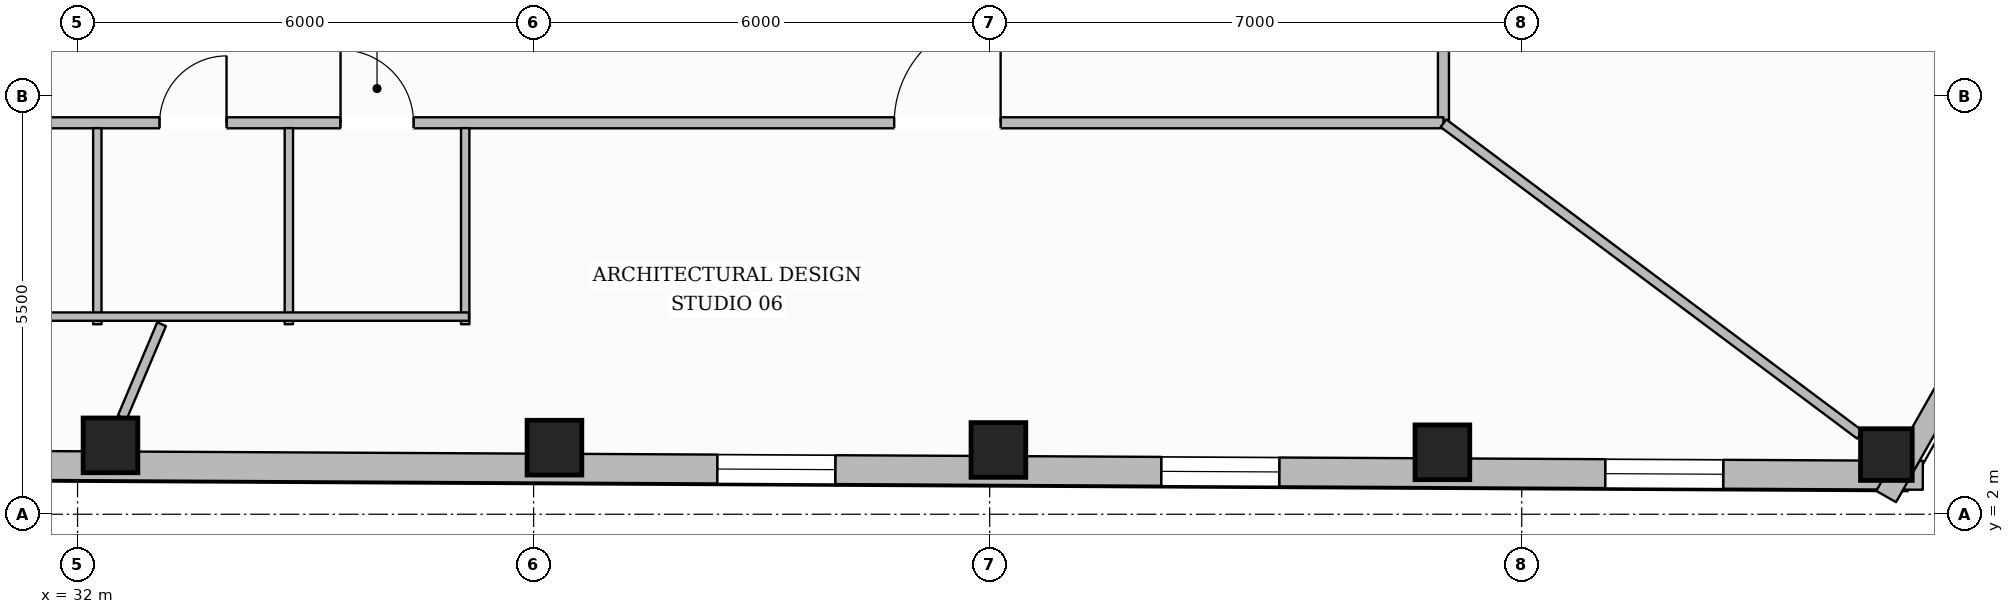
"""IFC4 building model, lengths in metres.
Left out: names, types, materials, properties, quantities, classifications, styles, units other than length and angle.
Written with IfcOpenShell. Run it as: python <this file> out.ifc"""

import sys

from ifc_helpers import new_model, si_unit, direction, frame, frame_2d, origin, origin_2d, place, context, subcontext, project, spatial, rectangle, hollow_rectangle, extrude, element, fill, save


model = new_model("IFC4")
c1 = context("Model", 3, precision=1e-05, world=origin(), true_north=direction((0.0, 1.0)))
c2 = subcontext(c1, "Body", "Model", "MODEL_VIEW")
j1 = project(units=[si_unit("LENGTHUNIT", "METRE"), si_unit("PLANEANGLEUNIT", "RADIAN")], contexts=[c1])
p1 = place(None, origin())
s1 = spatial("IfcSite", under=j1, at=p1, CompositionType="ELEMENT")
p2 = place(p1, origin())
s2 = spatial("IfcBuilding", under=s1, at=p2, CompositionType="ELEMENT")
p3 = place(p2, frame((0.0, 0.0, 100.9)))
s3 = spatial("IfcBuildingStorey", under=s2, at=p3, CompositionType="ELEMENT", Elevation=100.9)
for number, where, z_axis, x_axis in (
    (1, (32.433, 2.906, 0.0), (0.0, 0.0, 1.0), (1.0, 0.0, 0.0)),
    (2, (38.274, 2.876, 0.0), (0.0, 0.0, 1.0), (1.0, 0.0, 0.0)),
    (3, (44.115, 2.845, 0.0), (0.0, 0.0, 1.0), (1.0, 0.0, 0.0)),
    (4, (49.956, 2.815, 0.0), (0.0, 0.0, 1.0), (1.0, 0.0, 0.0)),
):
    element("IfcColumn", number, at=place(p3, frame(where, z_axis=z_axis, x_axis=x_axis)), inside=s3, PredefinedType="COLUMN", context=c2, shape_type="SweptSolid", body=[
        extrude(hollow_rectangle(XDim=0.72, YDim=0.72, WallThickness=0.032, at=origin_2d()), origin(), (0.0, 0.0, 1.0), 3.6),
    ])
p4 = place(p3, frame((55.797, 2.785, 0.0), z_axis=(0.0, 0.0, 1.0), x_axis=(1.0, 0.0, 0.0)))
e5 = element("IfcColumn", 5, at=p4, inside=s3, PredefinedType="COLUMN", context=c2, shape_type="SweptSolid", body=[
    extrude(hollow_rectangle(XDim=0.68, YDim=0.68, WallThickness=0.03, at=origin_2d()), origin(), (0.0, 0.0, 1.0), 3.6),
])
p5 = place(p3, frame((56.277, 2.512, 0.0), z_axis=(0.0, 0.0, 1.0), x_axis=(-0.999986545033, 0.005187461141, 0.0)))
e6 = element("IfcWall", 6, at=p5, inside=s3, PredefinedType="STANDARD", context=c2, shape_type="SweptSolid", body=[
    extrude(rectangle(XDim=36.004, YDim=0.38, at=frame_2d((18.002, 0.0))), origin(), (0.0, 0.0, 1.0), 3.059),
])
p6 = place(p5, frame((31.832, 0.0, 0.65)))
e7 = element("IfcOpeningElement", 7, at=p6, cuts=e6, PredefinedType="OPENING", context=c2, shape_type="SweptSolid", body=[
    extrude(rectangle(XDim=1.55, YDim=1.75, at=frame_2d((0.775, 0.875))), frame((0.0, 0.2, 0.0), z_axis=(0.0, -1.0, 0.0), x_axis=(1.0, 0.0, 0.0)), (0.0, 0.0, 1.0), 0.4),
])
p7 = place(p5, frame((25.991, 0.0, 0.65)))
e8 = element("IfcOpeningElement", 8, at=p7, cuts=e6, PredefinedType="OPENING", context=c2, shape_type="SweptSolid", body=[
    extrude(rectangle(XDim=1.55, YDim=1.75, at=frame_2d((0.775, 0.875))), frame((0.0, 0.2, 0.0), z_axis=(0.0, -1.0, 0.0), x_axis=(1.0, 0.0, 0.0)), (0.0, 0.0, 1.0), 0.4),
])
p8 = place(p5, frame((14.309, 0.0, 0.65)))
e9 = element("IfcOpeningElement", 9, at=p8, cuts=e6, PredefinedType="OPENING", context=c2, shape_type="SweptSolid", body=[
    extrude(rectangle(XDim=1.55, YDim=1.75, at=frame_2d((0.775, 0.875))), frame((0.0, 0.2, 0.0), z_axis=(0.0, -1.0, 0.0), x_axis=(1.0, 0.0, 0.0)), (0.0, 0.0, 1.0), 0.4),
])
p9 = place(p5, frame((8.468, 0.0, 0.65)))
e10 = element("IfcOpeningElement", 10, at=p9, cuts=e6, PredefinedType="OPENING", context=c2, shape_type="SweptSolid", body=[
    extrude(rectangle(XDim=1.55, YDim=1.75, at=frame_2d((0.775, 0.875))), frame((0.0, 0.2, 0.0), z_axis=(0.0, -1.0, 0.0), x_axis=(1.0, 0.0, 0.0)), (0.0, 0.0, 1.0), 0.4),
])
p10 = place(p5, frame((2.627, 0.0, 0.65)))
e11 = element("IfcOpeningElement", 11, at=p10, cuts=e6, PredefinedType="OPENING", context=c2, shape_type="SweptSolid", body=[
    extrude(rectangle(XDim=1.55, YDim=1.75, at=frame_2d((0.775, 0.875))), frame((0.0, 0.2, 0.0), z_axis=(0.0, -1.0, 0.0), x_axis=(1.0, 0.0, 0.0)), (0.0, 0.0, 1.0), 0.4),
])
p11 = place(p3, frame((62.28, 13.652, 0.0), z_axis=(0.0, 0.0, 1.0), x_axis=(-0.493862788891, -0.869539847131, 0.0)))
e12 = element("IfcWall", 12, at=p11, inside=s3, PredefinedType="STANDARD", context=c2, shape_type="SweptSolid", body=[
    extrude(rectangle(XDim=13.132, YDim=0.3, at=frame_2d((6.566, 0.0))), origin(), (0.0, 0.0, 1.0), 3.059),
])
p12 = place(p11, frame((5.966, 0.0, 0.65)))
e13 = element("IfcOpeningElement", 13, at=p12, cuts=e12, PredefinedType="OPENING", context=c2, shape_type="SweptSolid", body=[
    extrude(rectangle(XDim=1.2, YDim=1.7, at=frame_2d((0.6, 0.85))), frame((0.0, 0.16, 0.0), z_axis=(0.0, -1.0, 0.0), x_axis=(1.0, 0.0, 0.0)), (0.0, 0.0, 1.0), 0.32),
])
p13 = place(p3, frame((49.97, 7.15, 0.0), z_axis=(0.0, 0.0, 1.0), x_axis=(0.0, 1.0, 0.0)))
e14 = element("IfcWall", 14, at=p13, inside=s3, PredefinedType="PARTITIONING", context=c2, shape_type="SweptSolid", body=[
    extrude(rectangle(XDim=17.9, YDim=0.145, at=frame_2d((8.95, 0.0))), origin(), (0.0, 0.0, 1.0), 3.288),
])
p14 = place(p13, frame((8.25, 0.0, 0.0)))
e15 = element("IfcOpeningElement", 15, at=p14, cuts=e14, PredefinedType="OPENING", context=c2, shape_type="SweptSolid", body=[
    extrude(rectangle(XDim=1.4, YDim=2.2, at=frame_2d((0.7, 1.1))), frame((0.0, 0.083, 0.0), z_axis=(0.0, -1.0, 0.0), x_axis=(1.0, 0.0, 0.0)), (0.0, 0.0, 1.0), 0.165),
])
p15 = place(p3, frame((26.03, 7.15, 0.0), z_axis=(0.0, 0.0, 1.0), x_axis=(1.0, 0.0, 0.0)))
e16 = element("IfcWall", 16, at=p15, inside=s3, PredefinedType="PARTITIONING", context=c2, shape_type="SweptSolid", body=[
    extrude(rectangle(XDim=23.94, YDim=0.145, at=frame_2d((11.97, 0.0))), origin(), (0.0, 0.0, 1.0), 3.6),
])
p16 = place(p15, frame((4.53, 0.0, 0.0)))
e17 = element("IfcOpeningElement", 17, at=p16, cuts=e16, PredefinedType="OPENING", context=c2, shape_type="SweptSolid", body=[
    extrude(rectangle(XDim=0.88, YDim=2.1, at=frame_2d((0.44, 1.05))), frame((0.0, 0.083, 0.0), z_axis=(0.0, -1.0, 0.0), x_axis=(1.0, 0.0, 0.0)), (0.0, 0.0, 1.0), 0.165),
])
p17 = place(p15, frame((7.05, 0.0, 0.0)))
e18 = element("IfcOpeningElement", 18, at=p17, cuts=e16, PredefinedType="OPENING", context=c2, shape_type="SweptSolid", body=[
    extrude(rectangle(XDim=0.88, YDim=2.1, at=frame_2d((0.44, 1.05))), frame((0.0, 0.083, 0.0), z_axis=(0.0, -1.0, 0.0), x_axis=(1.0, 0.0, 0.0)), (0.0, 0.0, 1.0), 0.165),
])
p18 = place(p15, frame((9.43, 0.0, 0.0)))
e19 = element("IfcOpeningElement", 19, at=p18, cuts=e16, PredefinedType="OPENING", context=c2, shape_type="SweptSolid", body=[
    extrude(rectangle(XDim=0.96, YDim=2.1, at=frame_2d((0.48, 1.05))), frame((0.0, 0.083, 0.0), z_axis=(0.0, -1.0, 0.0), x_axis=(1.0, 0.0, 0.0)), (0.0, 0.0, 1.0), 0.165),
])
p19 = place(p15, frame((1.456, 0.0, 0.0)))
e20 = element("IfcOpeningElement", 20, at=p19, cuts=e16, PredefinedType="OPENING", context=c2, shape_type="SweptSolid", body=[
    extrude(rectangle(XDim=0.98, YDim=2.15, at=frame_2d((0.49, 1.075))), frame((0.0, 0.083, 0.0), z_axis=(0.0, -1.0, 0.0), x_axis=(1.0, 0.0, 0.0)), (0.0, 0.0, 1.0), 0.165),
])
p20 = place(p15, frame((16.714, 0.0, 0.0)))
e21 = element("IfcOpeningElement", 21, at=p20, cuts=e16, PredefinedType="OPENING", context=c2, shape_type="SweptSolid", body=[
    extrude(rectangle(XDim=1.4, YDim=2.2, at=frame_2d((0.7, 1.1))), frame((0.0, 0.083, 0.0), z_axis=(0.0, -1.0, 0.0), x_axis=(1.0, 0.0, 0.0)), (0.0, 0.0, 1.0), 0.165),
])
p21 = place(p3, frame((32.26, 4.5, 0.0), z_axis=(0.0, 0.0, 1.0), x_axis=(0.0, 1.0, 0.0)))
e22 = element("IfcWall", 22, at=p21, inside=s3, PredefinedType="PLUMBINGWALL", context=c2, shape_type="SweptSolid", body=[
    extrude(rectangle(XDim=2.58, YDim=0.11, at=frame_2d((1.29, 0.0))), origin(), (0.0, 0.0, 1.0), 3.141),
])
for number, where, z_axis, x_axis in (
    (23, (34.78, 4.5, 0.0), (0.0, 0.0, 1.0), (0.0, 1.0, 0.0)),
    (24, (37.1, 4.5, 0.0), (0.0, 0.0, 1.0), (0.0, 1.0, 0.0)),
):
    element("IfcWall", number, at=place(p3, frame(where, z_axis=z_axis, x_axis=x_axis)), inside=s3, PredefinedType="PLUMBINGWALL", context=c2, shape_type="SweptSolid", body=[
        extrude(rectangle(XDim=2.58, YDim=0.11, at=frame_2d((1.29, 0.0))), origin(), (0.0, 0.0, 1.0), 3.6),
    ])
p22 = place(p3, frame((29.69, 4.6, 0.0), z_axis=(0.0, 0.0, 1.0), x_axis=(1.0, 0.0, 0.0)))
e25 = element("IfcWall", 25, at=p22, inside=s3, PredefinedType="PLUMBINGWALL", context=c2, shape_type="SweptSolid", body=[
    extrude(rectangle(XDim=7.46, YDim=0.11, at=frame_2d((3.73, 0.0))), origin(), (0.0, 0.0, 1.0), 3.6),
])
p23 = place(p3, frame((33.106, 4.5, 0.0), z_axis=(0.0, 0.0, 1.0), x_axis=(-0.388819762507, -0.921313840276, 0.0)))
e26 = element("IfcWall", 26, at=p23, inside=s3, PredefinedType="PARTITIONING", context=c2, shape_type="SweptSolid", body=[
    extrude(rectangle(XDim=1.331, YDim=0.125, at=frame_2d((0.665, 0.0))), origin(), (0.0, 0.0, 1.0), 3.6),
])
p24 = place(p3, frame((49.97, 7.145, 0.0), z_axis=(0.0, 0.0, 1.0), x_axis=(0.800705856265, -0.599057703183, 0.0)))
e27 = element("IfcWall", 27, at=p24, inside=s3, PredefinedType="PARTITIONING", context=c2, shape_type="SweptSolid", body=[
    extrude(rectangle(XDim=6.843, YDim=0.125, at=frame_2d((3.421, 0.0))), origin(), (0.0, 0.0, 1.0), 3.141),
])
p25 = place(p8, origin())
e28 = element("IfcWindow", 28, at=p25, inside=s3, PartitioningType="SINGLE_PANEL", PredefinedType="WINDOW", context=c2, shape_type="SweptSolid", body=[
    extrude(rectangle(XDim=1.55, YDim=1.75, at=frame_2d((0.775, 0.875))), frame((0.0, 0.03, 0.0), z_axis=(0.0, -1.0, 0.0), x_axis=(1.0, 0.0, 0.0)), (0.0, 0.0, 1.0), 0.06),
])
fill(e9, e28)
p26 = place(p9, origin())
e29 = element("IfcWindow", 29, at=p26, inside=s3, PartitioningType="SINGLE_PANEL", PredefinedType="WINDOW", context=c2, shape_type="SweptSolid", body=[
    extrude(rectangle(XDim=1.55, YDim=1.75, at=frame_2d((0.775, 0.875))), frame((0.0, 0.03, 0.0), z_axis=(0.0, -1.0, 0.0), x_axis=(1.0, 0.0, 0.0)), (0.0, 0.0, 1.0), 0.06),
])
fill(e10, e29)
p27 = place(p10, origin())
e30 = element("IfcWindow", 30, at=p27, inside=s3, PartitioningType="SINGLE_PANEL", PredefinedType="WINDOW", context=c2, shape_type="SweptSolid", body=[
    extrude(rectangle(XDim=1.55, YDim=1.75, at=frame_2d((0.775, 0.875))), frame((0.0, 0.03, 0.0), z_axis=(0.0, -1.0, 0.0), x_axis=(1.0, 0.0, 0.0)), (0.0, 0.0, 1.0), 0.06),
])
fill(e11, e30)
p28 = place(p17, origin())
e31 = element("IfcDoor", 31, at=p28, inside=s3, OperationType="SINGLE_SWING_RIGHT", PredefinedType="DOOR", context=c2, shape_type="SweptSolid", body=[
    extrude(rectangle(XDim=0.88, YDim=2.1, at=frame_2d((0.44, 1.05))), frame((0.0, 0.025, 0.0), z_axis=(0.0, -1.0, 0.0), x_axis=(1.0, 0.0, 0.0)), (0.0, 0.0, 1.0), 0.05),
])
fill(e18, e31)
p29 = place(p18, origin())
e32 = element("IfcDoor", 32, at=p29, inside=s3, OperationType="SINGLE_SWING_LEFT", PredefinedType="DOOR", context=c2, shape_type="SweptSolid", body=[
    extrude(rectangle(XDim=0.96, YDim=2.1, at=frame_2d((0.48, 1.05))), frame((0.0, 0.025, 0.0), z_axis=(0.0, -1.0, 0.0), x_axis=(1.0, 0.0, 0.0)), (0.0, 0.0, 1.0), 0.05),
])
fill(e19, e32)
p30 = place(p20, origin())
e33 = element("IfcDoor", 33, at=p30, inside=s3, OperationType="SINGLE_SWING_RIGHT", PredefinedType="DOOR", context=c2, shape_type="SweptSolid", body=[
    extrude(rectangle(XDim=1.4, YDim=2.2, at=frame_2d((0.7, 1.1))), frame((0.0, 0.025, 0.0), z_axis=(0.0, -1.0, 0.0), x_axis=(1.0, 0.0, 0.0)), (0.0, 0.0, 1.0), 0.05),
])
fill(e21, e33)
save(model, sys.argv[1])
